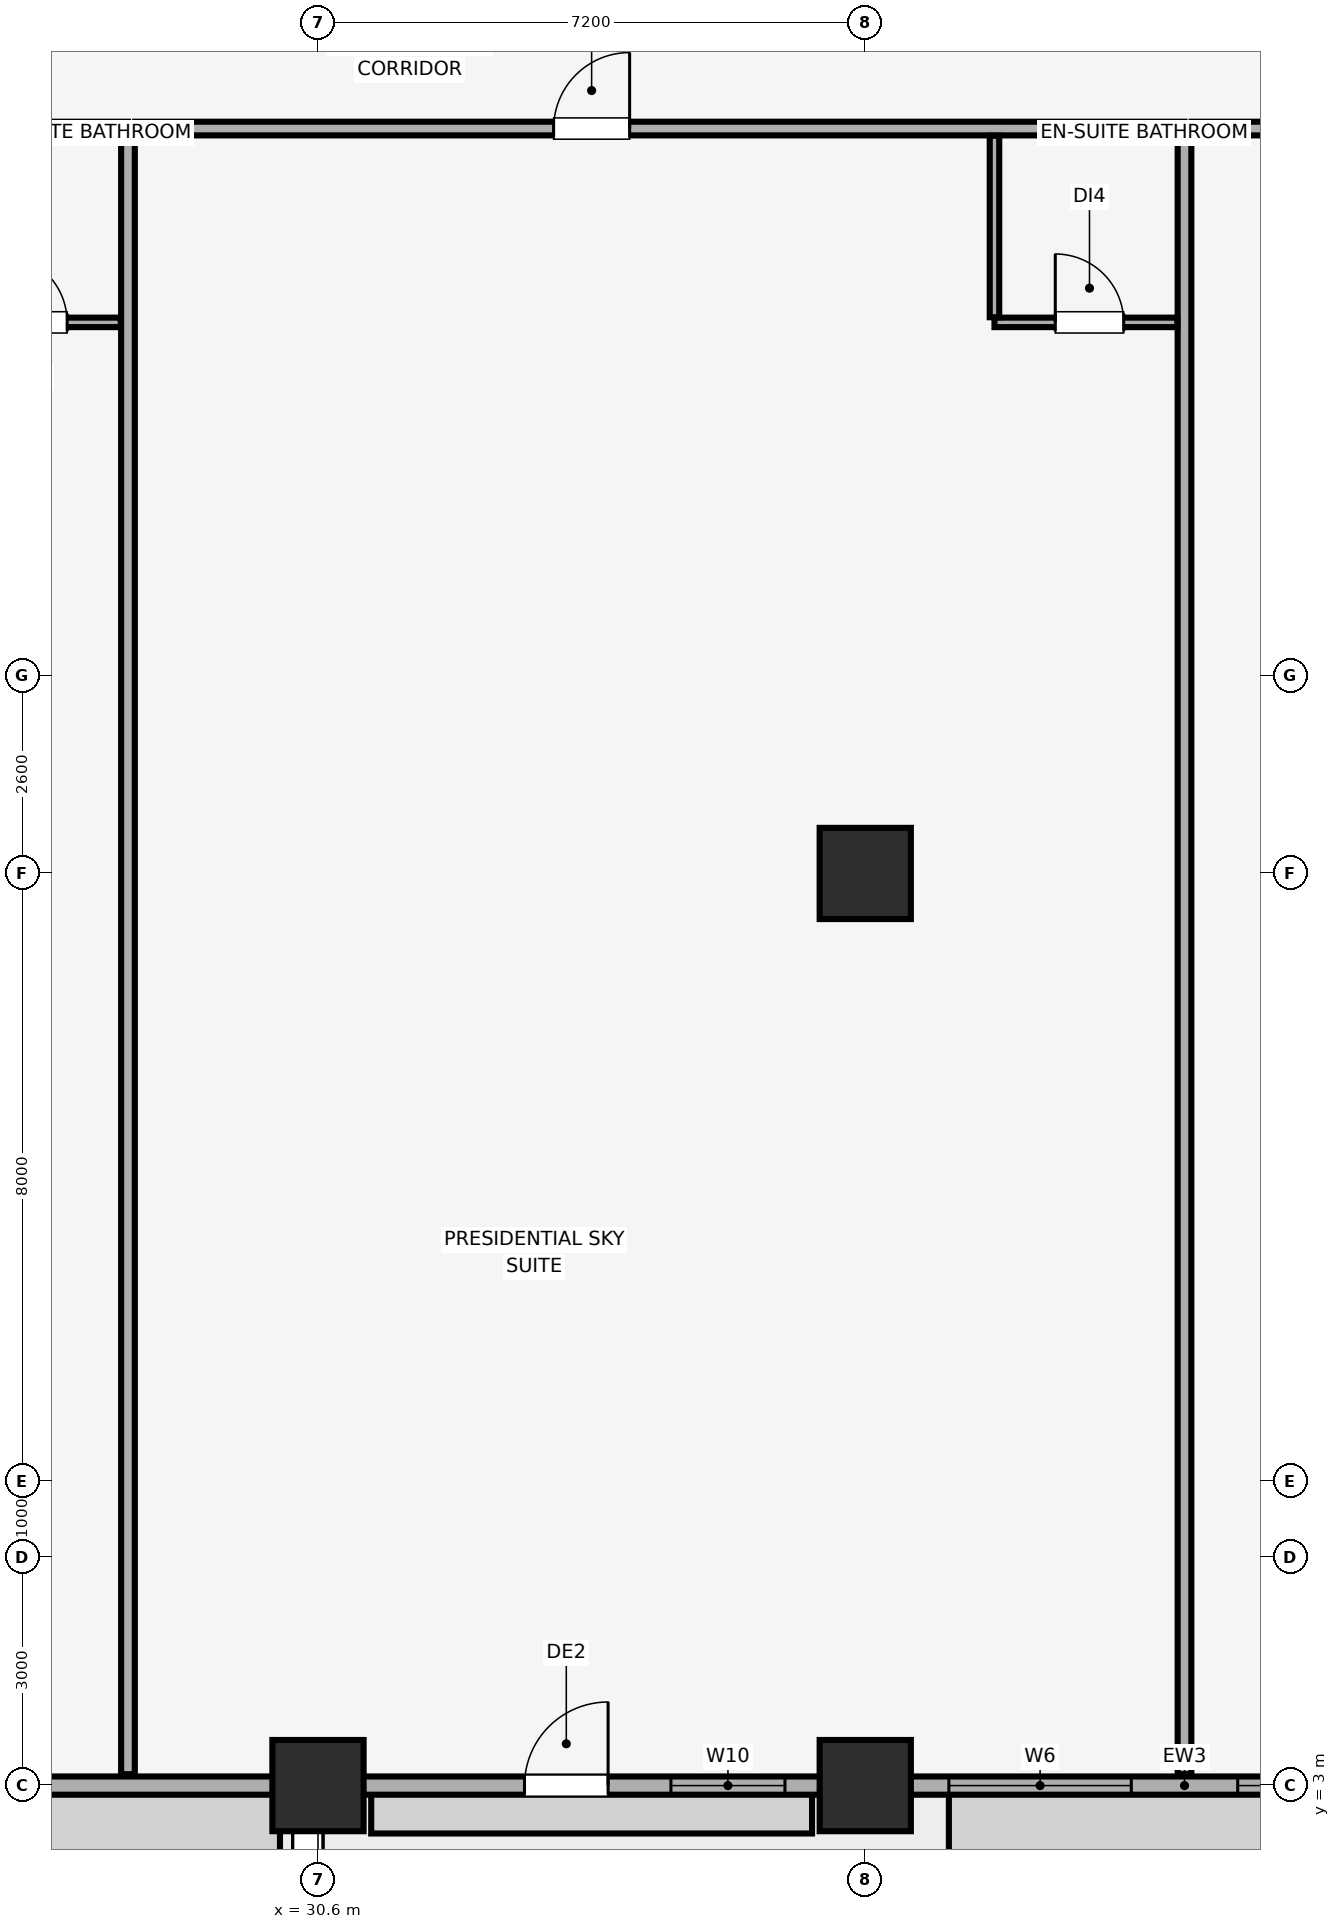
"""IFC4 building model, lengths in metres.
Left out: names, types, materials, properties, quantities, classifications, styles, units other than length and angle.
Written with IfcOpenShell. Run it as: python <this file> out.ifc"""

import sys

from ifc_helpers import new_model, si_unit, direction, frame, frame_2d, origin, origin_2d, place, context, subcontext, project, spatial, rectangle, extrude, element, fill, save


model = new_model("IFC4")
c1 = context("Model", 3, precision=1e-05, world=origin(), true_north=direction((0.0, 1.0)))
c2 = subcontext(c1, "Body", "Model", "MODEL_VIEW")
j1 = project(units=[si_unit("LENGTHUNIT", "METRE"), si_unit("PLANEANGLEUNIT", "RADIAN")], contexts=[c1])
p1 = place(None, origin())
s1 = spatial("IfcSite", under=j1, at=p1, CompositionType="ELEMENT")
p2 = place(p1, origin())
s2 = spatial("IfcBuilding", under=s1, at=p2, CompositionType="ELEMENT")
p3 = place(p2, frame((0.0, 0.0, 220.55)))
s3 = spatial("IfcBuildingStorey", under=s2, at=p3, CompositionType="ELEMENT", Elevation=220.55)
for number, where, z_axis, x_axis in (
    (1, (30.6, 3.0, 0.0), (0.0, 0.0, 1.0), (1.0, 0.0, 0.0)),
    (2, (37.8, 3.0, 0.0), (0.0, 0.0, 1.0), (1.0, 0.0, 0.0)),
    (3, (37.8, 15.0, 0.0), (0.0, 0.0, 1.0), (1.0, 0.0, 0.0)),
):
    element("IfcColumn", number, at=place(p3, frame(where, z_axis=z_axis, x_axis=x_axis)), inside=s3, PredefinedType="COLUMN", context=c2, shape_type="SweptSolid", body=[
        extrude(rectangle(XDim=1.2, YDim=1.2, at=origin_2d()), origin(), (0.0, 0.0, 1.0), 3.56),
    ])
p4 = place(p3, frame((7.0, 3.0, 0.0), z_axis=(0.0, 0.0, 1.0), x_axis=(1.0, 0.0, 0.0)))
e4 = element("IfcWall", 4, at=p4, inside=s3, PredefinedType="SOLIDWALL", context=c2, shape_type="SweptSolid", body=[
    extrude(rectangle(XDim=70.0, YDim=0.24, at=frame_2d((35.0, 0.0))), origin(), (0.0, 0.0, 1.0), 2.76),
])
p5 = place(p4, frame((17.86, 0.0, 0.0)))
e5 = element("IfcOpeningElement", 5, at=p5, cuts=e4, PredefinedType="OPENING", context=c2, shape_type="SweptSolid", body=[
    extrude(rectangle(XDim=1.1, YDim=2.15, at=frame_2d((0.55, 1.075))), frame((0.0, 0.13, 0.0), z_axis=(0.0, -1.0, 0.0), x_axis=(1.0, 0.0, 0.0)), (0.0, 0.0, 1.0), 0.26),
])
p6 = place(p4, frame((26.317, 0.0, 0.0)))
e6 = element("IfcOpeningElement", 6, at=p6, cuts=e4, PredefinedType="OPENING", context=c2, shape_type="SweptSolid", body=[
    extrude(rectangle(XDim=1.1, YDim=2.15, at=frame_2d((0.55, 1.075))), frame((0.0, 0.13, 0.0), z_axis=(0.0, -1.0, 0.0), x_axis=(1.0, 0.0, 0.0)), (0.0, 0.0, 1.0), 0.26),
])
p7 = place(p4, frame((57.517, 0.0, 0.0)))
e7 = element("IfcOpeningElement", 7, at=p7, cuts=e4, PredefinedType="OPENING", context=c2, shape_type="SweptSolid", body=[
    extrude(rectangle(XDim=1.1, YDim=2.15, at=frame_2d((0.55, 1.075))), frame((0.0, 0.13, 0.0), z_axis=(0.0, -1.0, 0.0), x_axis=(1.0, 0.0, 0.0)), (0.0, 0.0, 1.0), 0.26),
])
p8 = place(p4, frame((5.2, 0.0, 0.85)))
e8 = element("IfcOpeningElement", 8, at=p8, cuts=e4, PredefinedType="OPENING", context=c2, shape_type="SweptSolid", body=[
    extrude(rectangle(XDim=1.5, YDim=1.4, at=frame_2d((0.75, 0.7))), frame((0.0, 0.13, 0.0), z_axis=(0.0, -1.0, 0.0), x_axis=(1.0, 0.0, 0.0)), (0.0, 0.0, 1.0), 0.26),
])
p9 = place(p4, frame((10.7, 0.0, 0.85)))
e9 = element("IfcOpeningElement", 9, at=p9, cuts=e4, PredefinedType="OPENING", context=c2, shape_type="SweptSolid", body=[
    extrude(rectangle(XDim=4.2, YDim=1.65, at=frame_2d((2.1, 0.825))), frame((0.0, 0.13, 0.0), z_axis=(0.0, -1.0, 0.0), x_axis=(1.0, 0.0, 0.0)), (0.0, 0.0, 1.0), 0.26),
])
p10 = place(p4, frame((28.243, 0.0, 0.85)))
e10 = element("IfcOpeningElement", 10, at=p10, cuts=e4, PredefinedType="OPENING", context=c2, shape_type="SweptSolid", body=[
    extrude(rectangle(XDim=1.5, YDim=1.4, at=frame_2d((0.75, 0.7))), frame((0.0, 0.13, 0.0), z_axis=(0.0, -1.0, 0.0), x_axis=(1.0, 0.0, 0.0)), (0.0, 0.0, 1.0), 0.26),
])
p11 = place(p4, frame((31.9, 0.0, 0.85)))
e11 = element("IfcOpeningElement", 11, at=p11, cuts=e4, PredefinedType="OPENING", context=c2, shape_type="SweptSolid", body=[
    extrude(rectangle(XDim=2.4, YDim=1.5, at=frame_2d((1.2, 0.75))), frame((0.0, 0.13, 0.0), z_axis=(0.0, -1.0, 0.0), x_axis=(1.0, 0.0, 0.0)), (0.0, 0.0, 1.0), 0.26),
])
p12 = place(p4, frame((35.7, 0.0, 0.85)))
e12 = element("IfcOpeningElement", 12, at=p12, cuts=e4, PredefinedType="OPENING", context=c2, shape_type="SweptSolid", body=[
    extrude(rectangle(XDim=2.4, YDim=1.5, at=frame_2d((1.2, 0.75))), frame((0.0, 0.13, 0.0), z_axis=(0.0, -1.0, 0.0), x_axis=(1.0, 0.0, 0.0)), (0.0, 0.0, 1.0), 0.26),
])
p13 = place(p4, frame((40.7, 0.0, 0.85)))
e13 = element("IfcOpeningElement", 13, at=p13, cuts=e4, PredefinedType="OPENING", context=c2, shape_type="SweptSolid", body=[
    extrude(rectangle(XDim=4.2, YDim=1.65, at=frame_2d((2.1, 0.825))), frame((0.0, 0.13, 0.0), z_axis=(0.0, -1.0, 0.0), x_axis=(1.0, 0.0, 0.0)), (0.0, 0.0, 1.0), 0.26),
])
p14 = place(p4, frame((49.85, 0.0, 0.85)))
e14 = element("IfcOpeningElement", 14, at=p14, cuts=e4, PredefinedType="OPENING", context=c2, shape_type="SweptSolid", body=[
    extrude(rectangle(XDim=2.4, YDim=1.5, at=frame_2d((1.2, 0.75))), frame((0.0, 0.13, 0.0), z_axis=(0.0, -1.0, 0.0), x_axis=(1.0, 0.0, 0.0)), (0.0, 0.0, 1.0), 0.26),
])
p15 = place(p4, frame((54.473, 0.0, 0.85)))
e15 = element("IfcOpeningElement", 15, at=p15, cuts=e4, PredefinedType="OPENING", context=c2, shape_type="SweptSolid", body=[
    extrude(rectangle(XDim=2.4, YDim=1.5, at=frame_2d((1.2, 0.75))), frame((0.0, 0.13, 0.0), z_axis=(0.0, -1.0, 0.0), x_axis=(1.0, 0.0, 0.0)), (0.0, 0.0, 1.0), 0.26),
])
p16 = place(p4, frame((63.3, 0.0, 0.85)))
e16 = element("IfcOpeningElement", 16, at=p16, cuts=e4, PredefinedType="OPENING", context=c2, shape_type="SweptSolid", body=[
    extrude(rectangle(XDim=1.5, YDim=1.4, at=frame_2d((0.75, 0.7))), frame((0.0, 0.13, 0.0), z_axis=(0.0, -1.0, 0.0), x_axis=(1.0, 0.0, 0.0)), (0.0, 0.0, 1.0), 0.26),
])
p17 = place(p3, frame((14.2, 24.8, 0.0), z_axis=(0.0, 0.0, 1.0), x_axis=(1.0, 0.0, 0.0)))
e17 = element("IfcWall", 17, at=p17, inside=s3, PredefinedType="PARTITIONING", context=c2, shape_type="SweptSolid", body=[
    extrude(rectangle(XDim=13.9, YDim=0.18, at=frame_2d((6.95, 0.0))), origin(), (0.0, 0.0, 1.0), 3.56),
])
p18 = place(p17, frame((5.1, 0.0, 0.0)))
e18 = element("IfcOpeningElement", 18, at=p18, cuts=e17, PredefinedType="OPENING", context=c2, shape_type="SweptSolid", body=[
    extrude(rectangle(XDim=1.0, YDim=2.15, at=frame_2d((0.5, 1.075))), frame((0.0, 0.1, 0.0), z_axis=(0.0, -1.0, 0.0), x_axis=(1.0, 0.0, 0.0)), (0.0, 0.0, 1.0), 0.2),
])
p19 = place(p3, frame((28.1, 3.15, 0.0), z_axis=(0.0, 0.0, 1.0), x_axis=(0.0, 1.0, 0.0)))
e19 = element("IfcWall", 19, at=p19, inside=s3, PredefinedType="PARTITIONING", context=c2, shape_type="SweptSolid", body=[
    extrude(rectangle(XDim=21.555, YDim=0.18, at=frame_2d((10.778, 0.0))), origin(), (0.0, 0.0, 1.0), 3.56),
])
p20 = place(p3, frame((25.6, 22.25, 0.0), z_axis=(0.0, 0.0, 1.0), x_axis=(1.0, 0.0, 0.0)))
e20 = element("IfcWall", 20, at=p20, inside=s3, PredefinedType="PARTITIONING", context=c2, shape_type="SweptSolid", body=[
    extrude(rectangle(XDim=2.405, YDim=0.125, at=frame_2d((1.202, 0.0))), origin(), (0.0, 0.0, 1.0), 3.56),
])
p21 = place(p20, frame((0.8, 0.0, 0.0)))
e21 = element("IfcOpeningElement", 21, at=p21, cuts=e20, PredefinedType="OPENING", context=c2, shape_type="SweptSolid", body=[
    extrude(rectangle(XDim=0.9, YDim=2.1, at=frame_2d((0.45, 1.05))), frame((0.0, 0.073, 0.0), z_axis=(0.0, -1.0, 0.0), x_axis=(1.0, 0.0, 0.0)), (0.0, 0.0, 1.0), 0.145),
])
p22 = place(p3, frame((28.195, 24.8, 0.0), z_axis=(0.0, 0.0, 1.0), x_axis=(1.0, 0.0, 0.0)))
e22 = element("IfcWall", 22, at=p22, inside=s3, PredefinedType="PARTITIONING", context=c2, shape_type="SweptSolid", body=[
    extrude(rectangle(XDim=13.805, YDim=0.18, at=frame_2d((6.902, 0.0))), origin(), (0.0, 0.0, 1.0), 3.56),
])
p23 = place(p22, frame((5.505, 0.0, 0.0)))
e23 = element("IfcOpeningElement", 23, at=p23, cuts=e22, PredefinedType="OPENING", context=c2, shape_type="SweptSolid", body=[
    extrude(rectangle(XDim=1.0, YDim=2.15, at=frame_2d((0.5, 1.075))), frame((0.0, 0.1, 0.0), z_axis=(0.0, -1.0, 0.0), x_axis=(1.0, 0.0, 0.0)), (0.0, 0.0, 1.0), 0.2),
])
p24 = place(p3, frame((42.0, 3.15, 0.0), z_axis=(0.0, 0.0, 1.0), x_axis=(0.0, 1.0, 0.0)))
e24 = element("IfcWall", 24, at=p24, inside=s3, PredefinedType="PARTITIONING", context=c2, shape_type="SweptSolid", body=[
    extrude(rectangle(XDim=21.555, YDim=0.18, at=frame_2d((10.778, 0.0))), origin(), (0.0, 0.0, 1.0), 2.96),
])
p25 = place(p3, frame((39.5, 22.25, 0.0), z_axis=(0.0, 0.0, 1.0), x_axis=(1.0, 0.0, 0.0)))
e25 = element("IfcWall", 25, at=p25, inside=s3, PredefinedType="PARTITIONING", context=c2, shape_type="SweptSolid", body=[
    extrude(rectangle(XDim=2.405, YDim=0.125, at=frame_2d((1.203, 0.0))), origin(), (0.0, 0.0, 1.0), 3.56),
])
p26 = place(p25, frame((0.8, 0.0, 0.0)))
e26 = element("IfcOpeningElement", 26, at=p26, cuts=e25, PredefinedType="OPENING", context=c2, shape_type="SweptSolid", body=[
    extrude(rectangle(XDim=0.9, YDim=2.1, at=frame_2d((0.45, 1.05))), frame((0.0, 0.073, 0.0), z_axis=(0.0, -1.0, 0.0), x_axis=(1.0, 0.0, 0.0)), (0.0, 0.0, 1.0), 0.145),
])
p27 = place(p3, frame((39.5, 22.317, 0.0), z_axis=(0.0, 0.0, 1.0), x_axis=(0.0, 1.0, 0.0)))
e27 = element("IfcWall", 27, at=p27, inside=s3, PredefinedType="PARTITIONING", context=c2, shape_type="SweptSolid", body=[
    extrude(rectangle(XDim=2.388, YDim=0.125, at=frame_2d((1.194, 0.0))), origin(), (0.0, 0.0, 1.0), 3.56),
])
p28 = place(p3, frame((42.095, 24.8, 0.0), z_axis=(0.0, 0.0, 1.0), x_axis=(1.0, 0.0, 0.0)))
e28 = element("IfcWall", 28, at=p28, inside=s3, PredefinedType="PARTITIONING", context=c2, shape_type="SweptSolid", body=[
    extrude(rectangle(XDim=13.805, YDim=0.18, at=frame_2d((6.902, 0.0))), origin(), (0.0, 0.0, 1.0), 3.56),
])
p29 = place(p28, frame((7.145, 0.0, 0.0)))
e29 = element("IfcOpeningElement", 29, at=p29, cuts=e28, PredefinedType="OPENING", context=c2, shape_type="SweptSolid", body=[
    extrude(rectangle(XDim=1.0, YDim=2.15, at=frame_2d((0.5, 1.075))), frame((0.0, 0.1, 0.0), z_axis=(0.0, -1.0, 0.0), x_axis=(1.0, 0.0, 0.0)), (0.0, 0.0, 1.0), 0.2),
])
p30 = place(p6, origin())
e30 = element("IfcDoor", 30, at=p30, inside=s3, OperationType="SINGLE_SWING_RIGHT", PredefinedType="DOOR", context=c2, shape_type="SweptSolid", body=[
    extrude(rectangle(XDim=1.1, YDim=2.15, at=frame_2d((0.55, 1.075))), frame((0.0, 0.025, 0.0), z_axis=(0.0, -1.0, 0.0), x_axis=(1.0, 0.0, 0.0)), (0.0, 0.0, 1.0), 0.05),
])
fill(e6, e30)
p31 = place(p10, origin())
e31 = element("IfcWindow", 31, at=p31, inside=s3, PartitioningType="SINGLE_PANEL", PredefinedType="WINDOW", context=c2, shape_type="SweptSolid", body=[
    extrude(rectangle(XDim=1.5, YDim=1.4, at=frame_2d((0.75, 0.7))), frame((0.0, 0.03, 0.0), z_axis=(0.0, -1.0, 0.0), x_axis=(1.0, 0.0, 0.0)), (0.0, 0.0, 1.0), 0.06),
])
fill(e10, e31)
p32 = place(p11, origin())
e32 = element("IfcWindow", 32, at=p32, inside=s3, PartitioningType="SINGLE_PANEL", PredefinedType="WINDOW", context=c2, shape_type="SweptSolid", body=[
    extrude(rectangle(XDim=2.4, YDim=1.5, at=frame_2d((1.2, 0.75))), frame((0.0, 0.03, 0.0), z_axis=(0.0, -1.0, 0.0), x_axis=(1.0, 0.0, 0.0)), (0.0, 0.0, 1.0), 0.06),
])
fill(e11, e32)
p33 = place(p12, origin())
e33 = element("IfcWindow", 33, at=p33, inside=s3, PartitioningType="SINGLE_PANEL", PredefinedType="WINDOW", context=c2, shape_type="SweptSolid", body=[
    extrude(rectangle(XDim=2.4, YDim=1.5, at=frame_2d((1.2, 0.75))), frame((0.0, 0.03, 0.0), z_axis=(0.0, -1.0, 0.0), x_axis=(1.0, 0.0, 0.0)), (0.0, 0.0, 1.0), 0.06),
])
fill(e12, e33)
p34 = place(p21, origin())
e34 = element("IfcDoor", 34, at=p34, inside=s3, OperationType="SINGLE_SWING_LEFT", PredefinedType="DOOR", context=c2, shape_type="SweptSolid", body=[
    extrude(rectangle(XDim=0.9, YDim=2.1, at=frame_2d((0.45, 1.05))), frame((0.0, 0.025, 0.0), z_axis=(0.0, -1.0, 0.0), x_axis=(1.0, 0.0, 0.0)), (0.0, 0.0, 1.0), 0.05),
])
fill(e21, e34)
p35 = place(p23, origin())
e35 = element("IfcDoor", 35, at=p35, inside=s3, OperationType="SINGLE_SWING_RIGHT", PredefinedType="DOOR", context=c2, shape_type="SweptSolid", body=[
    extrude(rectangle(XDim=1.0, YDim=2.15, at=frame_2d((0.5, 1.075))), frame((0.0, 0.025, 0.0), z_axis=(0.0, -1.0, 0.0), x_axis=(1.0, 0.0, 0.0)), (0.0, 0.0, 1.0), 0.05),
])
fill(e23, e35)
p36 = place(p26, origin())
e36 = element("IfcDoor", 36, at=p36, inside=s3, OperationType="SINGLE_SWING_LEFT", PredefinedType="DOOR", context=c2, shape_type="SweptSolid", body=[
    extrude(rectangle(XDim=0.9, YDim=2.1, at=frame_2d((0.45, 1.05))), frame((0.0, 0.025, 0.0), z_axis=(0.0, -1.0, 0.0), x_axis=(1.0, 0.0, 0.0)), (0.0, 0.0, 1.0), 0.05),
])
fill(e26, e36)
save(model, sys.argv[1])
